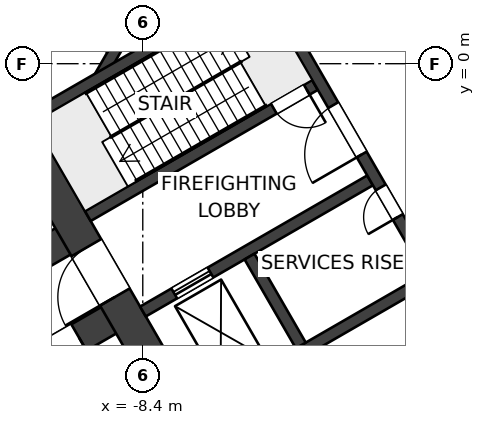
"""IFC4 building model, lengths in metres.
Left out: names, types, materials, properties, quantities, classifications, styles, units other than length and angle.
Written with IfcOpenShell. Run it as: python <this file> out.ifc"""

import sys

from ifc_helpers import new_model, si_unit, direction, frame, frame_2d, origin, place, context, subcontext, project, spatial, polyline, rectangle, outline, extrude, element, fill, save


model = new_model("IFC4")
c1 = context("Model", 3, precision=1e-05, world=origin(), true_north=direction((0.0, 1.0)))
c2 = subcontext(c1, "Body", "Model", "MODEL_VIEW")
j1 = project(units=[si_unit("LENGTHUNIT", "METRE"), si_unit("PLANEANGLEUNIT", "RADIAN")], contexts=[c1])
p1 = place(None, origin())
s1 = spatial("IfcSite", under=j1, at=p1, CompositionType="ELEMENT")
p2 = place(p1, origin())
s2 = spatial("IfcBuilding", under=s1, at=p2, CompositionType="ELEMENT")
p3 = place(p2, frame((0.0, 0.0, 16.0)))
s3 = spatial("IfcBuildingStorey", under=s2, at=p3, CompositionType="ELEMENT", Elevation=16.0)
p4 = place(p3, frame((-6.47, -10.757, 0.0), z_axis=(0.0, 0.0, 1.0), x_axis=(-0.499997612506, 0.8660267822, 0.0)))
e1 = element("IfcWall", 1, at=p4, inside=s3, PredefinedType="SHEAR", context=c2, shape_type="SweptSolid", body=[
    extrude(rectangle(XDim=12.161, YDim=0.9, at=frame_2d((6.08, 0.0))), origin(), (0.0, 0.0, 1.0), 5.0),
])
p5 = place(p4, frame((5.33, 0.0, 0.0)))
e2 = element("IfcOpeningElement", 2, at=p5, cuts=e1, PredefinedType="OPENING", context=c2, shape_type="SweptSolid", body=[
    extrude(rectangle(XDim=1.5, YDim=2.1, at=frame_2d((0.75, 1.05))), frame((0.0, 0.46, 0.0), z_axis=(0.0, -1.0, 0.0), x_axis=(1.0, 0.0, 0.0)), (0.0, 0.0, 1.0), 0.92),
])
p6 = place(p3, origin())
e3 = element("IfcWall", 3, at=p6, inside=s3, PredefinedType="SHEAR", context=c2, shape_type="SweptSolid", body=[
    extrude(outline(polyline([(-6.6, 11.432), (-13.2, 0.0), (-12.94, -0.45), (-12.161, 0.0), (-6.08, 10.531), (-6.08, 11.432), (-6.6, 11.432)])), origin(), (0.0, 0.0, 1.0), 5.0),
])
p7 = place(p3, frame((-0.714, -5.724, 0.0), z_axis=(0.0, 0.0, 1.0), x_axis=(-0.499995050369, 0.866028261437, 0.0)))
e4 = element("IfcWall", 4, at=p7, inside=s3, PredefinedType="SHEAR", context=c2, shape_type="SweptSolid", body=[
    extrude(rectangle(XDim=9.2, YDim=0.3, at=frame_2d((4.6, 0.0))), origin(), (0.0, 0.0, 1.0), 5.0),
])
p8 = place(p7, frame((3.85, 0.0, 0.0)))
e5 = element("IfcOpeningElement", 5, at=p8, cuts=e4, PredefinedType="OPENING", context=c2, shape_type="SweptSolid", body=[
    extrude(rectangle(XDim=1.5, YDim=2.1, at=frame_2d((0.75, 1.05))), frame((0.0, 0.16, 0.0), z_axis=(0.0, -1.0, 0.0), x_axis=(1.0, 0.0, 0.0)), (0.0, 0.0, 1.0), 0.32),
])
p9 = place(p7, frame((1.95, 0.0, 0.0)))
e6 = element("IfcOpeningElement", 6, at=p9, cuts=e4, PredefinedType="OPENING", context=c2, shape_type="SweptSolid", body=[
    extrude(rectangle(XDim=0.9, YDim=2.1, at=frame_2d((0.45, 1.05))), frame((0.0, 0.16, 0.0), z_axis=(0.0, -1.0, 0.0), x_axis=(1.0, 0.0, 0.0)), (0.0, 0.0, 1.0), 0.32),
])
p10 = place(p3, frame((-3.869, -0.559, 0.0), z_axis=(0.0, 0.0, 1.0), x_axis=(-0.86602711848, -0.499997030048, 0.0)))
e7 = element("IfcWall", 7, at=p10, inside=s3, PredefinedType="SHEAR", context=c2, shape_type="SweptSolid", body=[
    extrude(rectangle(XDim=6.901, YDim=0.3, at=frame_2d((3.451, 0.0))), origin(), (0.0, 0.0, 1.0), 5.0),
])
p11 = place(p10, frame((0.25, 0.0, 0.0)))
e8 = element("IfcOpeningElement", 8, at=p11, cuts=e7, PredefinedType="OPENING", context=c2, shape_type="SweptSolid", body=[
    extrude(rectangle(XDim=1.0, YDim=2.1, at=frame_2d((0.5, 1.05))), frame((0.0, 0.16, 0.0), z_axis=(0.0, -1.0, 0.0), x_axis=(1.0, 0.0, 0.0)), (0.0, 0.0, 1.0), 0.32),
])
p12 = place(p3, frame((-5.369, 2.039, 0.0), z_axis=(0.0, 0.0, 1.0), x_axis=(-0.86602711848, -0.499997030048, 0.0)))
e9 = element("IfcWall", 9, at=p12, inside=s3, PredefinedType="SHEAR", context=c2, shape_type="SweptSolid", body=[
    extrude(rectangle(XDim=6.901, YDim=0.3, at=frame_2d((3.451, 0.0))), origin(), (0.0, 0.0, 1.0), 5.0),
])
p13 = place(p3, frame((-2.419, -3.071, 0.0), z_axis=(0.0, 0.0, 1.0), x_axis=(-0.86602711848, -0.499997030048, 0.0)))
e10 = element("IfcWall", 10, at=p13, inside=s3, PredefinedType="SHEAR", context=c2, shape_type="SweptSolid", body=[
    extrude(rectangle(XDim=6.901, YDim=0.3, at=frame_2d((3.451, 0.0))), origin(), (0.0, 0.0, 1.0), 5.0),
])
p14 = place(p13, frame((4.85, 0.0, 0.0)))
e11 = element("IfcOpeningElement", 11, at=p14, cuts=e10, PredefinedType="OPENING", context=c2, shape_type="SweptSolid", body=[
    extrude(rectangle(XDim=1.1, YDim=2.1, at=frame_2d((0.55, 1.05))), frame((0.0, 0.16, 0.0), z_axis=(0.0, -1.0, 0.0), x_axis=(1.0, 0.0, 0.0)), (0.0, 0.0, 1.0), 0.32),
])
p15 = place(p3, frame((-0.919, -5.669, 0.0), z_axis=(0.0, 0.0, 1.0), x_axis=(-0.866011800373, -0.500023561059, 0.0)))
e12 = element("IfcWall", 12, at=p15, inside=s3, PredefinedType="SHEAR", context=c2, shape_type="SweptSolid", body=[
    extrude(rectangle(XDim=6.902, YDim=0.3, at=frame_2d((3.451, 0.0))), origin(), (0.0, 0.0, 1.0), 5.0),
])
p16 = place(p3, frame((-4.241, -7.414, 0.0), z_axis=(0.0, 0.0, 1.0), x_axis=(-0.500048589285, 0.86599734893, 0.0)))
e13 = element("IfcWall", 13, at=p16, inside=s3, PredefinedType="SHEAR", context=c2, shape_type="SweptSolid", body=[
    extrude(rectangle(XDim=2.7, YDim=0.3, at=frame_2d((1.35, 0.0))), origin(), (0.0, 0.0, 1.0), 5.0),
])
p17 = place(p3, frame((-9.548, -0.374, 0.0), z_axis=(0.0, 0.0, 1.0), x_axis=(0.500002290144, 0.866024081565, 0.0)))
e14 = element("IfcWall", 14, at=p17, inside=s3, PredefinedType="SHEAR", context=c2, shape_type="SweptSolid", body=[
    extrude(rectangle(XDim=10.195, YDim=0.3, at=frame_2d((5.098, 0.0))), origin(), (0.0, 0.0, 1.0), 5.0),
])
p18 = place(p3, frame((-9.254, 0.435, 0.0), z_axis=(0.0, 0.0, 1.0), x_axis=(-0.866007057882, 0.500031774688, 0.0)))
e15 = element("IfcWall", 15, at=p18, inside=s3, PredefinedType="SHEAR", context=c2, shape_type="SweptSolid", body=[
    extrude(rectangle(XDim=2.3, YDim=0.3, at=frame_2d((1.15, 0.0))), origin(), (0.0, 0.0, 1.0), 5.0),
])
p19 = place(p3, frame((-8.91, -6.53, 0.0), z_axis=(0.0, 0.0, 1.0), x_axis=(-0.866025284237, -0.500000207062, 0.0)))
e16 = element("IfcWall", 16, at=p19, inside=s3, PredefinedType="SHEAR", context=c2, shape_type="SweptSolid", body=[
    extrude(rectangle(XDim=36.75, YDim=0.8, at=frame_2d((18.375, 0.0))), origin(), (0.0, 0.0, 1.0), 5.0),
])
p20 = place(p19, frame((1.35, 0.0, 0.0)))
e17 = element("IfcOpeningElement", 17, at=p20, cuts=e16, PredefinedType="OPENING", context=c2, shape_type="SweptSolid", body=[
    extrude(rectangle(XDim=1.2, YDim=2.1, at=frame_2d((0.6, 1.05))), frame((0.0, 0.41, 0.0), z_axis=(0.0, -1.0, 0.0), x_axis=(1.0, 0.0, 0.0)), (0.0, 0.0, 1.0), 0.82),
])
p21 = place(p3, frame((-10.11, -4.451, 0.0), z_axis=(0.0, 0.0, 1.0), x_axis=(-0.866025284237, -0.500000207062, 0.0)))
e18 = element("IfcWall", 18, at=p21, inside=s3, PredefinedType="SHEAR", context=c2, shape_type="SweptSolid", body=[
    extrude(rectangle(XDim=36.75, YDim=0.8, at=frame_2d((18.375, 0.0))), origin(), (0.0, 0.0, 1.0), 5.0),
])
p22 = place(p21, frame((10.0, 0.0, 0.0)))
e19 = element("IfcOpeningElement", 19, at=p22, cuts=e18, PredefinedType="OPENING", context=c2, shape_type="SweptSolid", body=[
    extrude(rectangle(XDim=1.0, YDim=2.1, at=frame_2d((0.5, 1.05))), frame((0.0, 0.41, 0.0), z_axis=(0.0, -1.0, 0.0), x_axis=(1.0, 0.0, 0.0)), (0.0, 0.0, 1.0), 0.82),
])
p23 = place(p21, frame((2.85, 0.0, 0.0)))
e20 = element("IfcOpeningElement", 20, at=p23, cuts=e18, PredefinedType="OPENING", context=c2, shape_type="SweptSolid", body=[
    extrude(rectangle(XDim=1.2, YDim=2.1, at=frame_2d((0.6, 1.05))), frame((0.0, 0.41, 0.0), z_axis=(0.0, -1.0, 0.0), x_axis=(1.0, 0.0, 0.0)), (0.0, 0.0, 1.0), 0.82),
])
p24 = place(p3, frame((-9.45, 6.495, 0.0), z_axis=(0.0, 0.0, 1.0), x_axis=(-0.866025301493, -0.500000177174, 0.0)))
e21 = element("IfcWall", 21, at=p24, inside=s3, PredefinedType="SOLIDWALL", context=c2, shape_type="SweptSolid", body=[
    extrude(rectangle(XDim=43.095, YDim=0.3, at=frame_2d((21.548, 0.0))), origin(), (0.0, 0.0, 1.0), 4.7),
])
p25 = place(p24, frame((26.595, 0.0, 0.0)))
e22 = element("IfcOpeningElement", 22, at=p25, cuts=e21, PredefinedType="OPENING", context=c2, shape_type="SweptSolid", body=[
    extrude(rectangle(XDim=1.8, YDim=2.4, at=frame_2d((0.9, 1.2))), frame((0.0, 0.16, 0.0), z_axis=(0.0, -1.0, 0.0), x_axis=(1.0, 0.0, 0.0)), (0.0, 0.0, 1.0), 0.32),
])
p26 = place(p14, origin())
e23 = element("IfcDoor", 23, at=p26, inside=s3, OperationType="DOUBLE_DOOR_SLIDING", PredefinedType="DOOR", context=c2, shape_type="SweptSolid", body=[
    extrude(rectangle(XDim=1.1, YDim=2.1, at=frame_2d((0.55, 1.05))), frame((0.0, 0.025, 0.0), z_axis=(0.0, -1.0, 0.0), x_axis=(1.0, 0.0, 0.0)), (0.0, 0.0, 1.0), 0.05),
])
fill(e11, e23)
p27 = place(p8, origin())
e24 = element("IfcDoor", 24, at=p27, inside=s3, OperationType="DOUBLE_DOOR_DOUBLE_SWING", PredefinedType="DOOR", context=c2, shape_type="SweptSolid", body=[
    extrude(rectangle(XDim=1.5, YDim=2.1, at=frame_2d((0.75, 1.05))), frame((0.0, 0.025, 0.0), z_axis=(0.0, -1.0, 0.0), x_axis=(1.0, 0.0, 0.0)), (0.0, 0.0, 1.0), 0.05),
])
fill(e5, e24)
p28 = place(p9, origin())
e25 = element("IfcDoor", 25, at=p28, inside=s3, OperationType="SINGLE_SWING_LEFT", PredefinedType="DOOR", context=c2, shape_type="SweptSolid", body=[
    extrude(rectangle(XDim=0.9, YDim=2.1, at=frame_2d((0.45, 1.05))), frame((0.0, 0.025, 0.0), z_axis=(0.0, -1.0, 0.0), x_axis=(1.0, 0.0, 0.0)), (0.0, 0.0, 1.0), 0.05),
])
fill(e6, e25)
p29 = place(p11, origin())
e26 = element("IfcDoor", 26, at=p29, inside=s3, OperationType="SINGLE_SWING_LEFT", PredefinedType="DOOR", context=c2, shape_type="SweptSolid", body=[
    extrude(rectangle(XDim=1.0, YDim=2.1, at=frame_2d((0.5, 1.05))), frame((0.0, 0.025, 0.0), z_axis=(0.0, -1.0, 0.0), x_axis=(1.0, 0.0, 0.0)), (0.0, 0.0, 1.0), 0.05),
])
fill(e8, e26)
p30 = place(p5, origin())
e27 = element("IfcDoor", 27, at=p30, inside=s3, OperationType="DOUBLE_DOOR_DOUBLE_SWING", PredefinedType="DOOR", context=c2, shape_type="SweptSolid", body=[
    extrude(rectangle(XDim=1.5, YDim=2.1, at=frame_2d((0.75, 1.05))), frame((0.0, 0.025, 0.0), z_axis=(0.0, -1.0, 0.0), x_axis=(1.0, 0.0, 0.0)), (0.0, 0.0, 1.0), 0.05),
])
fill(e2, e27)
p31 = place(p20, origin())
e28 = element("IfcDoor", 28, at=p31, inside=s3, OperationType="DOUBLE_SWING_LEFT", PredefinedType="DOOR", context=c2, shape_type="SweptSolid", body=[
    extrude(rectangle(XDim=1.2, YDim=2.1, at=frame_2d((0.6, 1.05))), frame((0.0, 0.025, 0.0), z_axis=(0.0, -1.0, 0.0), x_axis=(1.0, 0.0, 0.0)), (0.0, 0.0, 1.0), 0.05),
])
fill(e17, e28)
save(model, sys.argv[1])
